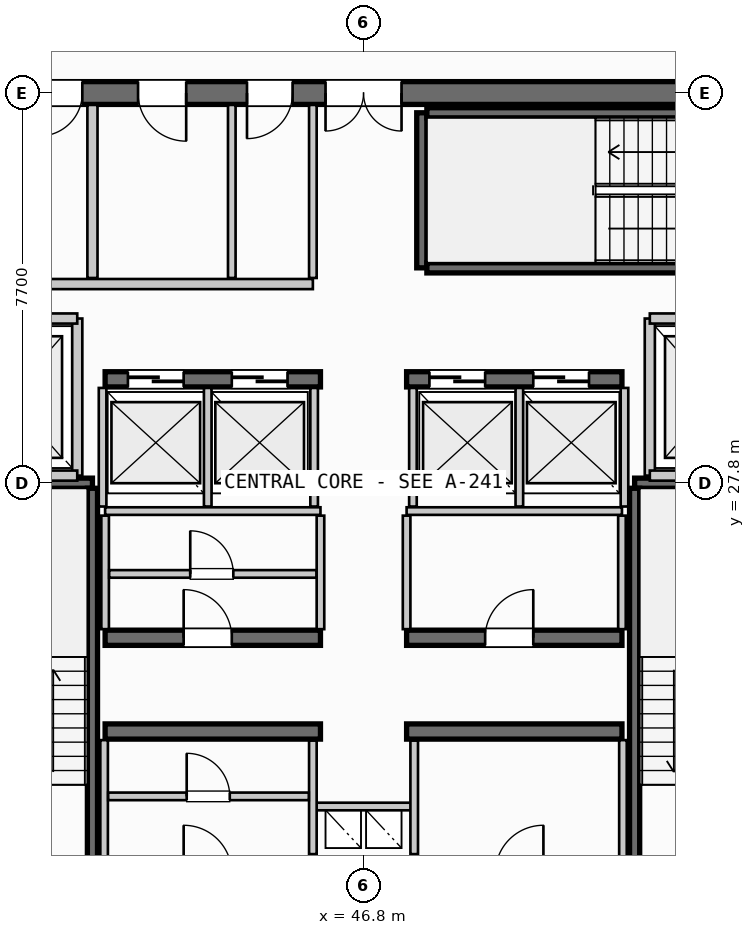
"""IFC4 building model, lengths in metres.
Left out: names, types, materials, properties, quantities, classifications, styles, units other than length and angle.
Written with IfcOpenShell. Run it as: python <this file> out.ifc"""

import sys

from ifc_helpers import new_model, si_unit, direction, frame, frame_2d, origin, place, context, subcontext, project, spatial, rectangle, extrude, source, transform, mapped, element, fill, save


model = new_model("IFC4")
c1 = context("Model", 3, precision=1e-05, world=origin(), true_north=direction((0.0, 1.0)))
c2 = subcontext(c1, "Body", "Model", "MODEL_VIEW")
j1 = project(units=[si_unit("LENGTHUNIT", "METRE"), si_unit("PLANEANGLEUNIT", "RADIAN")], contexts=[c1])
p1 = place(None, origin())
s1 = spatial("IfcSite", under=j1, at=p1, CompositionType="ELEMENT")
p2 = place(p1, origin())
s2 = spatial("IfcBuilding", under=s1, at=p2, CompositionType="ELEMENT")
p3 = place(p2, frame((0.0, 0.0, 293.95)))
s3 = spatial("IfcBuildingStorey", under=s2, at=p3, CompositionType="ELEMENT", Elevation=293.95)
p4 = place(p3, frame((55.6, 35.5, 0.0), z_axis=(0.0, 0.0, 1.0), x_axis=(-1.0, 0.0, 0.0)))
e1 = element("IfcWall", 1, at=p4, inside=s3, PredefinedType="SHEAR", context=c2, shape_type="SweptSolid", body=[
    extrude(rectangle(XDim=17.6, YDim=0.45, at=frame_2d((8.8, 0.0))), origin(), (0.0, 0.0, 1.0), 3.21),
])
p5 = place(p4, frame((8.05, 0.0, 0.0)))
e2 = element("IfcOpeningElement", 2, at=p5, cuts=e1, PredefinedType="OPENING", context=c2, shape_type="SweptSolid", body=[
    extrude(rectangle(XDim=1.5, YDim=2.2, at=frame_2d((0.75, 1.1))), frame((0.0, 0.235, 0.0), z_axis=(0.0, -1.0, 0.0), x_axis=(1.0, 0.0, 0.0)), (0.0, 0.0, 1.0), 0.47),
])
p6 = place(p4, frame((15.85, 0.0, 0.0)))
e3 = element("IfcOpeningElement", 3, at=p6, cuts=e1, PredefinedType="OPENING", context=c2, shape_type="SweptSolid", body=[
    extrude(rectangle(XDim=0.85, YDim=2.15, at=frame_2d((0.425, 1.075))), frame((0.0, 0.235, 0.0), z_axis=(0.0, -1.0, 0.0), x_axis=(1.0, 0.0, 0.0)), (0.0, 0.0, 1.0), 0.47),
])
p7 = place(p4, frame((14.35, 0.0, 0.0)))
e4 = element("IfcOpeningElement", 4, at=p7, cuts=e1, PredefinedType="OPENING", context=c2, shape_type="SweptSolid", body=[
    extrude(rectangle(XDim=0.85, YDim=2.15, at=frame_2d((0.425, 1.075))), frame((0.0, 0.235, 0.0), z_axis=(0.0, -1.0, 0.0), x_axis=(1.0, 0.0, 0.0)), (0.0, 0.0, 1.0), 0.47),
])
p8 = place(p4, frame((12.3, 0.0, 0.0)))
e5 = element("IfcOpeningElement", 5, at=p8, cuts=e1, PredefinedType="OPENING", context=c2, shape_type="SweptSolid", body=[
    extrude(rectangle(XDim=0.95, YDim=2.15, at=frame_2d((0.475, 1.075))), frame((0.0, 0.235, 0.0), z_axis=(0.0, -1.0, 0.0), x_axis=(1.0, 0.0, 0.0)), (0.0, 0.0, 1.0), 0.47),
])
p9 = place(p4, frame((10.2, 0.0, 0.0)))
e6 = element("IfcOpeningElement", 6, at=p9, cuts=e1, PredefinedType="OPENING", context=c2, shape_type="SweptSolid", body=[
    extrude(rectangle(XDim=0.9, YDim=2.15, at=frame_2d((0.45, 1.075))), frame((0.0, 0.235, 0.0), z_axis=(0.0, -1.0, 0.0), x_axis=(1.0, 0.0, 0.0)), (0.0, 0.0, 1.0), 0.47),
])
for number, where, z_axis, x_axis in (
    (7, (41.7, 22.9, 0.0), (0.0, 0.0, 1.0), (1.0, 0.0, 0.0)),
    (8, (47.65, 22.9, 0.0), (0.0, 0.0, 1.0), (1.0, 0.0, 0.0)),
):
    element("IfcWall", number, at=place(p3, frame(where, z_axis=z_axis, x_axis=x_axis)), inside=s3, PredefinedType="SHEAR", context=c2, shape_type="SweptSolid", body=[
        extrude(rectangle(XDim=4.25, YDim=0.3, at=frame_2d((2.125, 0.0))), origin(), (0.0, 0.0, 1.0), 3.21),
    ])
p10 = place(p3, frame((41.7, 24.75, 0.0), z_axis=(0.0, 0.0, 1.0), x_axis=(1.0, 0.0, 0.0)))
e9 = element("IfcWall", 9, at=p10, inside=s3, PredefinedType="SHEAR", context=c2, shape_type="SweptSolid", body=[
    extrude(rectangle(XDim=4.25, YDim=0.3, at=frame_2d((2.125, 0.0))), origin(), (0.0, 0.0, 1.0), 3.21),
])
p11 = place(p10, frame((1.55, 0.0, 0.0)))
e10 = element("IfcOpeningElement", 10, at=p11, cuts=e9, PredefinedType="OPENING", context=c2, shape_type="SweptSolid", body=[
    extrude(rectangle(XDim=0.95, YDim=2.15, at=frame_2d((0.475, 1.075))), frame((0.0, 0.16, 0.0), z_axis=(0.0, -1.0, 0.0), x_axis=(1.0, 0.0, 0.0)), (0.0, 0.0, 1.0), 0.32),
])
p12 = place(p3, frame((47.65, 24.75, 0.0), z_axis=(0.0, 0.0, 1.0), x_axis=(1.0, 0.0, 0.0)))
e11 = element("IfcWall", 11, at=p12, inside=s3, PredefinedType="SHEAR", context=c2, shape_type="SweptSolid", body=[
    extrude(rectangle(XDim=4.25, YDim=0.3, at=frame_2d((2.125, 0.0))), origin(), (0.0, 0.0, 1.0), 3.21),
])
p13 = place(p12, frame((1.55, 0.0, 0.0)))
e12 = element("IfcOpeningElement", 12, at=p13, cuts=e11, PredefinedType="OPENING", context=c2, shape_type="SweptSolid", body=[
    extrude(rectangle(XDim=0.95, YDim=2.15, at=frame_2d((0.475, 1.075))), frame((0.0, 0.16, 0.0), z_axis=(0.0, -1.0, 0.0), x_axis=(1.0, 0.0, 0.0)), (0.0, 0.0, 1.0), 0.32),
])
p14 = place(p3, frame((41.7, 29.85, 0.0), z_axis=(0.0, 0.0, 1.0), x_axis=(1.0, 0.0, 0.0)))
e13 = element("IfcWall", 13, at=p14, inside=s3, PredefinedType="SHEAR", context=c2, shape_type="SweptSolid", body=[
    extrude(rectangle(XDim=4.25, YDim=0.3, at=frame_2d((2.125, 0.0))), origin(), (0.0, 0.0, 1.0), 3.21),
])
p15 = place(p14, frame((0.45, 0.0, 0.0)))
e14 = element("IfcOpeningElement", 14, at=p15, cuts=e13, PredefinedType="OPENING", context=c2, shape_type="SweptSolid", body=[
    extrude(rectangle(XDim=1.1, YDim=2.2, at=frame_2d((0.55, 1.1))), frame((0.0, 0.16, 0.0), z_axis=(0.0, -1.0, 0.0), x_axis=(1.0, 0.0, 0.0)), (0.0, 0.0, 1.0), 0.32),
])
p16 = place(p14, frame((2.5, 0.0, 0.0)))
e15 = element("IfcOpeningElement", 15, at=p16, cuts=e13, PredefinedType="OPENING", context=c2, shape_type="SweptSolid", body=[
    extrude(rectangle(XDim=1.1, YDim=2.2, at=frame_2d((0.55, 1.1))), frame((0.0, 0.16, 0.0), z_axis=(0.0, -1.0, 0.0), x_axis=(1.0, 0.0, 0.0)), (0.0, 0.0, 1.0), 0.32),
])
p17 = place(p3, frame((47.65, 29.85, 0.0), z_axis=(0.0, 0.0, 1.0), x_axis=(1.0, 0.0, 0.0)))
e16 = element("IfcWall", 16, at=p17, inside=s3, PredefinedType="SHEAR", context=c2, shape_type="SweptSolid", body=[
    extrude(rectangle(XDim=4.25, YDim=0.3, at=frame_2d((2.125, 0.0))), origin(), (0.0, 0.0, 1.0), 3.21),
])
p18 = place(p17, frame((0.45, 0.0, 0.0)))
e17 = element("IfcOpeningElement", 17, at=p18, cuts=e16, PredefinedType="OPENING", context=c2, shape_type="SweptSolid", body=[
    extrude(rectangle(XDim=1.1, YDim=2.2, at=frame_2d((0.55, 1.1))), frame((0.0, 0.16, 0.0), z_axis=(0.0, -1.0, 0.0), x_axis=(1.0, 0.0, 0.0)), (0.0, 0.0, 1.0), 0.32),
])
p19 = place(p17, frame((2.5, 0.0, 0.0)))
e18 = element("IfcOpeningElement", 18, at=p19, cuts=e16, PredefinedType="OPENING", context=c2, shape_type="SweptSolid", body=[
    extrude(rectangle(XDim=1.1, YDim=2.2, at=frame_2d((0.55, 1.1))), frame((0.0, 0.16, 0.0), z_axis=(0.0, -1.0, 0.0), x_axis=(1.0, 0.0, 0.0)), (0.0, 0.0, 1.0), 0.32),
])
p20 = place(p3, frame((38.39, 27.8, 0.0), z_axis=(0.0, 0.0, 1.0), x_axis=(1.0, 0.0, 0.0)))
e19 = element("IfcWall", 19, at=p20, inside=s3, PredefinedType="SHEAR", context=c2, shape_type="SweptSolid", body=[
    extrude(rectangle(XDim=3.06, YDim=0.2, at=frame_2d((1.53, 0.0))), origin(), (0.0, 0.0, 1.0), 3.21),
])
p21 = place(p3, frame((41.45, 27.7, 0.0), z_axis=(0.0, 0.0, 1.0), x_axis=(0.0, -1.0, 0.0)))
e20 = element("IfcWall", 20, at=p21, inside=s3, PredefinedType="SHEAR", context=c2, shape_type="SweptSolid", body=[
    extrude(rectangle(XDim=7.35, YDim=0.2, at=frame_2d((3.675, 0.0))), origin(), (0.0, 0.0, 1.0), 3.21),
])
p22 = place(p3, frame((52.15, 27.8, 0.0), z_axis=(0.0, 0.0, 1.0), x_axis=(1.0, 0.0, 0.0)))
e21 = element("IfcWall", 21, at=p22, inside=s3, PredefinedType="SHEAR", context=c2, shape_type="SweptSolid", body=[
    extrude(rectangle(XDim=3.06, YDim=0.2, at=frame_2d((1.53, 0.0))), origin(), (0.0, 0.0, 1.0), 3.21),
])
p23 = place(p3, frame((52.15, 20.35, 0.0), z_axis=(0.0, 0.0, 1.0), x_axis=(0.0, 1.0, 0.0)))
e22 = element("IfcWall", 22, at=p23, inside=s3, PredefinedType="SHEAR", context=c2, shape_type="SweptSolid", body=[
    extrude(rectangle(XDim=7.35, YDim=0.2, at=frame_2d((3.675, 0.0))), origin(), (0.0, 0.0, 1.0), 3.21),
])
p24 = place(p3, frame((47.95, 32.05, 0.0), z_axis=(0.0, 0.0, 1.0), x_axis=(0.0, 1.0, 0.0)))
e23 = element("IfcWall", 23, at=p24, inside=s3, PredefinedType="SHEAR", context=c2, shape_type="SweptSolid", body=[
    extrude(rectangle(XDim=3.06, YDim=0.2, at=frame_2d((1.53, 0.0))), origin(), (0.0, 0.0, 1.0), 3.21),
])
for number, where, z_axis, x_axis in (
    (24, (48.05, 35.11, 0.0), (0.0, 0.0, 1.0), (1.0, 0.0, 0.0)),
    (25, (55.4, 32.05, 0.0), (0.0, 0.0, 1.0), (-1.0, 0.0, 0.0)),
):
    element("IfcWall", number, at=place(p3, frame(where, z_axis=z_axis, x_axis=x_axis)), inside=s3, PredefinedType="SHEAR", context=c2, shape_type="SweptSolid", body=[
        extrude(rectangle(XDim=7.35, YDim=0.2, at=frame_2d((3.675, 0.0))), origin(), (0.0, 0.0, 1.0), 3.21),
    ])
p25 = place(p3, frame((45.8, 21.42, 0.0), z_axis=(0.0, 0.0, 1.0), x_axis=(1.0, 0.0, 0.0)))
e26 = element("IfcWall", 26, at=p25, inside=s3, PredefinedType="PARTITIONING", context=c2, shape_type="SweptSolid", body=[
    extrude(rectangle(XDim=2.0, YDim=0.15, at=frame_2d((1.0, 0.0))), origin(), (0.0, 0.0, 1.0), 2.315),
])
for number, where, z_axis, x_axis in (
    (27, (45.8, 20.48, 0.0), (0.0, 0.0, 1.0), (0.0, 1.0, 0.0)),
    (28, (47.8, 20.48, 0.0), (0.0, 0.0, 1.0), (0.0, 1.0, 0.0)),
):
    element("IfcWall", number, at=place(p3, frame(where, z_axis=z_axis, x_axis=x_axis)), inside=s3, PredefinedType="PARTITIONING", context=c2, shape_type="SweptSolid", body=[
        extrude(rectangle(XDim=2.24, YDim=0.15, at=frame_2d((1.12, 0.0))), origin(), (0.0, 0.0, 1.0), 2.315),
    ])
p26 = place(p3, frame((41.15, 27.95, 0.0), z_axis=(0.0, 0.0, 1.0), x_axis=(0.0, 1.0, 0.0)))
e29 = element("IfcWall", 29, at=p26, inside=s3, PredefinedType="PARTITIONING", context=c2, shape_type="SweptSolid", body=[
    extrude(rectangle(XDim=3.1, YDim=0.2, at=frame_2d((1.55, 0.0))), origin(), (0.0, 0.0, 1.0), 2.315),
])
for number, where, z_axis, x_axis in (
    (30, (38.235, 27.95, 0.0), (0.0, 0.0, 1.0), (1.0, 0.0, 0.0)),
    (31, (38.235, 31.05, 0.0), (0.0, 0.0, 1.0), (1.0, 0.0, 0.0)),
):
    element("IfcWall", number, at=place(p3, frame(where, z_axis=z_axis, x_axis=x_axis)), inside=s3, PredefinedType="PARTITIONING", context=c2, shape_type="SweptSolid", body=[
        extrude(rectangle(XDim=2.915, YDim=0.2, at=frame_2d((1.458, 0.0))), origin(), (0.0, 0.0, 1.0), 2.315),
    ])
p27 = place(p3, frame((52.45, 27.95, 0.0), z_axis=(0.0, 0.0, 1.0), x_axis=(0.0, 1.0, 0.0)))
e32 = element("IfcWall", 32, at=p27, inside=s3, PredefinedType="PARTITIONING", context=c2, shape_type="SweptSolid", body=[
    extrude(rectangle(XDim=3.1, YDim=0.2, at=frame_2d((1.55, 0.0))), origin(), (0.0, 0.0, 1.0), 2.315),
])
for number, where, z_axis, x_axis in (
    (33, (52.45, 27.95, 0.0), (0.0, 0.0, 1.0), (1.0, 0.0, 0.0)),
    (34, (52.45, 31.05, 0.0), (0.0, 0.0, 1.0), (1.0, 0.0, 0.0)),
):
    element("IfcWall", number, at=place(p3, frame(where, z_axis=z_axis, x_axis=x_axis)), inside=s3, PredefinedType="PARTITIONING", context=c2, shape_type="SweptSolid", body=[
        extrude(rectangle(XDim=2.915, YDim=0.2, at=frame_2d((1.458, 0.0))), origin(), (0.0, 0.0, 1.0), 2.315),
    ])
for number, where, z_axis, x_axis in (
    (35, (41.68, 20.335, 0.0), (0.0, 0.0, 1.0), (0.0, 1.0, 0.0)),
    (36, (51.92, 20.335, 0.0), (0.0, 0.0, 1.0), (0.0, 1.0, 0.0)),
):
    element("IfcWall", number, at=place(p3, frame(where, z_axis=z_axis, x_axis=x_axis)), inside=s3, PredefinedType="PARTITIONING", context=c2, shape_type="SweptSolid", body=[
        extrude(rectangle(XDim=2.395, YDim=0.15, at=frame_2d((1.198, 0.0))), origin(), (0.0, 0.0, 1.0), 2.315),
    ])
p28 = place(p3, frame((41.76, 21.62, 0.0), z_axis=(0.0, 0.0, 1.0), x_axis=(1.0, 0.0, 0.0)))
e37 = element("IfcWall", 37, at=p28, inside=s3, PredefinedType="PARTITIONING", context=c2, shape_type="SweptSolid", body=[
    extrude(rectangle(XDim=3.96, YDim=0.15, at=frame_2d((1.98, 0.0))), origin(), (0.0, 0.0, 1.0), 2.315),
])
p29 = place(p28, frame((1.55, 0.0, 0.0)))
e38 = element("IfcOpeningElement", 38, at=p29, cuts=e37, PredefinedType="OPENING", context=c2, shape_type="SweptSolid", body=[
    extrude(rectangle(XDim=0.85, YDim=2.15, at=frame_2d((0.425, 1.075))), frame((0.0, 0.085, 0.0), z_axis=(0.0, -1.0, 0.0), x_axis=(1.0, 0.0, 0.0)), (0.0, 0.0, 1.0), 0.17),
])
for number, where, z_axis, x_axis in (
    (39, (41.7, 27.25, 0.0), (0.0, 0.0, 1.0), (1.0, 0.0, 0.0)),
    (40, (47.65, 27.25, 0.0), (0.0, 0.0, 1.0), (1.0, 0.0, 0.0)),
):
    element("IfcWall", number, at=place(p3, frame(where, z_axis=z_axis, x_axis=x_axis)), inside=s3, PredefinedType="PARTITIONING", context=c2, shape_type="SweptSolid", body=[
        extrude(rectangle(XDim=4.25, YDim=0.15, at=frame_2d((2.125, 0.0))), origin(), (0.0, 0.0, 1.0), 2.315),
    ])
for number, where, z_axis, x_axis in (
    (41, (41.7, 24.92, 0.0), (0.0, 0.0, 1.0), (0.0, 1.0, 0.0)),
    (42, (45.95, 24.92, 0.0), (0.0, 0.0, 1.0), (0.0, 1.0, 0.0)),
    (43, (47.65, 24.92, 0.0), (0.0, 0.0, 1.0), (0.0, 1.0, 0.0)),
    (44, (51.9, 24.92, 0.0), (0.0, 0.0, 1.0), (0.0, 1.0, 0.0)),
):
    element("IfcWall", number, at=place(p3, frame(where, z_axis=z_axis, x_axis=x_axis)), inside=s3, PredefinedType="PARTITIONING", context=c2, shape_type="SweptSolid", body=[
        extrude(rectangle(XDim=2.24, YDim=0.15, at=frame_2d((1.12, 0.0))), origin(), (0.0, 0.0, 1.0), 2.315),
    ])
p30 = place(p3, frame((41.78, 26.01, 0.0), z_axis=(0.0, 0.0, 1.0), x_axis=(1.0, 0.0, 0.0)))
e45 = element("IfcWall", 45, at=p30, inside=s3, PredefinedType="PARTITIONING", context=c2, shape_type="SweptSolid", body=[
    extrude(rectangle(XDim=4.09, YDim=0.15, at=frame_2d((2.045, 0.0))), origin(), (0.0, 0.0, 1.0), 2.315),
])
p31 = place(p30, frame((1.6, 0.0, 0.0)))
e46 = element("IfcOpeningElement", 46, at=p31, cuts=e45, PredefinedType="OPENING", context=c2, shape_type="SweptSolid", body=[
    extrude(rectangle(XDim=0.85, YDim=2.15, at=frame_2d((0.425, 1.075))), frame((0.0, 0.085, 0.0), z_axis=(0.0, -1.0, 0.0), x_axis=(1.0, 0.0, 0.0)), (0.0, 0.0, 1.0), 0.17),
])
for number, where, z_axis, x_axis in (
    (47, (41.65, 27.34, 0.0), (0.0, 0.0, 1.0), (0.0, 1.0, 0.0)),
    (48, (43.725, 27.34, 0.0), (0.0, 0.0, 1.0), (0.0, 1.0, 0.0)),
    (49, (45.825, 27.34, 0.0), (0.0, 0.0, 1.0), (0.0, 1.0, 0.0)),
    (50, (47.775, 27.34, 0.0), (0.0, 0.0, 1.0), (0.0, 1.0, 0.0)),
    (51, (49.875, 27.34, 0.0), (0.0, 0.0, 1.0), (0.0, 1.0, 0.0)),
    (52, (51.95, 27.34, 0.0), (0.0, 0.0, 1.0), (0.0, 1.0, 0.0)),
):
    element("IfcWall", number, at=place(p3, frame(where, z_axis=z_axis, x_axis=x_axis)), inside=s3, PredefinedType="PARTITIONING", context=c2, shape_type="SweptSolid", body=[
        extrude(rectangle(XDim=2.34, YDim=0.15, at=frame_2d((1.17, 0.0))), origin(), (0.0, 0.0, 1.0), 2.315),
    ])
p32 = place(p3, frame((41.45, 31.85, 0.0), z_axis=(0.0, 0.0, 1.0), x_axis=(0.0, 1.0, 0.0)))
e53 = element("IfcWall", 53, at=p32, inside=s3, PredefinedType="PARTITIONING", context=c2, shape_type="SweptSolid", body=[
    extrude(rectangle(XDim=3.415, YDim=0.2, at=frame_2d((1.708, 0.0))), origin(), (0.0, 0.0, 1.0), 2.315),
])
p33 = place(p3, frame((38.235, 31.73, 0.0), z_axis=(0.0, 0.0, 1.0), x_axis=(1.0, 0.0, 0.0)))
e54 = element("IfcWall", 54, at=p33, inside=s3, PredefinedType="PARTITIONING", context=c2, shape_type="SweptSolid", body=[
    extrude(rectangle(XDim=7.565, YDim=0.2, at=frame_2d((3.782, 0.0))), origin(), (0.0, 0.0, 1.0), 2.315),
])
p34 = place(p3, frame((45.8, 31.85, 0.0), z_axis=(0.0, 0.0, 1.0), x_axis=(0.0, 1.0, 0.0)))
e55 = element("IfcWall", 55, at=p34, inside=s3, PredefinedType="PARTITIONING", context=c2, shape_type="SweptSolid", body=[
    extrude(rectangle(XDim=3.415, YDim=0.15, at=frame_2d((1.708, 0.0))), origin(), (0.0, 0.0, 1.0), 2.315),
])
p35 = place(p3, frame((44.2, 31.85, 0.0), z_axis=(0.0, 0.0, 1.0), x_axis=(0.0, 1.0, 0.0)))
e56 = element("IfcWall", 56, at=p35, inside=s3, PredefinedType="PLUMBINGWALL", context=c2, shape_type="SweptSolid", body=[
    extrude(rectangle(XDim=3.415, YDim=0.15, at=frame_2d((1.708, 0.0))), origin(), (0.0, 0.0, 1.0), 2.315),
])
m1 = source(origin(), c2, "Body", "SweptSolid", [
    extrude(rectangle(XDim=1.5, YDim=2.2, at=frame_2d((0.75, 1.1))), frame((0.0, 0.025, 0.0), z_axis=(0.0, -1.0, 0.0), x_axis=(1.0, 0.0, 0.0)), (0.0, 0.0, 1.0), 0.05),
])
p36 = place(p5, origin())
e57 = element("IfcDoor", 57, at=p36, inside=s3, OperationType="DOUBLE_DOOR_SINGLE_SWING", PredefinedType="DOOR", context=c2, shape_type="MappedRepresentation", body=[
    mapped(m1, transform((0.0, 0.0, 0.0), scale=1.0)),
])
fill(e2, e57)
m2 = source(origin(), c2, "Body", "SweptSolid", [
    extrude(rectangle(XDim=0.95, YDim=2.15, at=frame_2d((0.475, 1.075))), frame((0.0, 0.025, 0.0), z_axis=(0.0, -1.0, 0.0), x_axis=(1.0, 0.0, 0.0)), (0.0, 0.0, 1.0), 0.05),
])
p37 = place(p11, origin())
e58 = element("IfcDoor", 58, at=p37, inside=s3, OperationType="SINGLE_SWING_LEFT", PredefinedType="DOOR", context=c2, shape_type="MappedRepresentation", body=[
    mapped(m2, transform((0.0, 0.0, 0.0), scale=1.0)),
])
fill(e10, e58)
p38 = place(p13, origin())
e59 = element("IfcDoor", 59, at=p38, inside=s3, OperationType="SINGLE_SWING_RIGHT", PredefinedType="DOOR", context=c2, shape_type="MappedRepresentation", body=[
    mapped(m2, transform((0.0, 0.0, 0.0), scale=1.0)),
])
fill(e12, e59)
m3 = source(origin(), c2, "Body", "SweptSolid", [
    extrude(rectangle(XDim=1.1, YDim=2.2, at=frame_2d((0.55, 1.1))), frame((0.0, 0.025, 0.0), z_axis=(0.0, -1.0, 0.0), x_axis=(1.0, 0.0, 0.0)), (0.0, 0.0, 1.0), 0.05),
])
p39 = place(p15, origin())
e60 = element("IfcDoor", 60, at=p39, inside=s3, OperationType="SLIDING_TO_LEFT", PredefinedType="DOOR", context=c2, shape_type="MappedRepresentation", body=[
    mapped(m3, transform((0.0, 0.0, 0.0), scale=1.0)),
])
fill(e14, e60)
p40 = place(p16, origin())
e61 = element("IfcDoor", 61, at=p40, inside=s3, OperationType="SLIDING_TO_LEFT", PredefinedType="DOOR", context=c2, shape_type="MappedRepresentation", body=[
    mapped(m3, transform((0.0, 0.0, 0.0), scale=1.0)),
])
fill(e15, e61)
p41 = place(p18, origin())
e62 = element("IfcDoor", 62, at=p41, inside=s3, OperationType="SLIDING_TO_LEFT", PredefinedType="DOOR", context=c2, shape_type="MappedRepresentation", body=[
    mapped(m3, transform((0.0, 0.0, 0.0), scale=1.0)),
])
fill(e17, e62)
p42 = place(p19, origin())
e63 = element("IfcDoor", 63, at=p42, inside=s3, OperationType="SLIDING_TO_LEFT", PredefinedType="DOOR", context=c2, shape_type="MappedRepresentation", body=[
    mapped(m3, transform((0.0, 0.0, 0.0), scale=1.0)),
])
fill(e18, e63)
m4 = source(origin(), c2, "Body", "SweptSolid", [
    extrude(rectangle(XDim=0.85, YDim=2.15, at=frame_2d((0.425, 1.075))), frame((0.0, 0.025, 0.0), z_axis=(0.0, -1.0, 0.0), x_axis=(1.0, 0.0, 0.0)), (0.0, 0.0, 1.0), 0.05),
])
p43 = place(p7, origin())
e64 = element("IfcDoor", 64, at=p43, inside=s3, OperationType="SINGLE_SWING_RIGHT", PredefinedType="DOOR", context=c2, shape_type="MappedRepresentation", body=[
    mapped(m4, transform((0.0, 0.0, 0.0), scale=1.0)),
])
fill(e4, e64)
p44 = place(p8, origin())
e65 = element("IfcDoor", 65, at=p44, inside=s3, OperationType="SINGLE_SWING_LEFT", PredefinedType="DOOR", context=c2, shape_type="MappedRepresentation", body=[
    mapped(m2, transform((0.0, 0.0, 0.0), scale=1.0)),
])
fill(e5, e65)
m5 = source(origin(), c2, "Body", "SweptSolid", [
    extrude(rectangle(XDim=0.9, YDim=2.15, at=frame_2d((0.45, 1.075))), frame((0.0, 0.025, 0.0), z_axis=(0.0, -1.0, 0.0), x_axis=(1.0, 0.0, 0.0)), (0.0, 0.0, 1.0), 0.05),
])
p45 = place(p9, origin())
e66 = element("IfcDoor", 66, at=p45, inside=s3, OperationType="SINGLE_SWING_RIGHT", PredefinedType="DOOR", context=c2, shape_type="MappedRepresentation", body=[
    mapped(m5, transform((0.0, 0.0, 0.0), scale=1.0)),
])
fill(e6, e66)
p46 = place(p29, origin())
e67 = element("IfcDoor", 67, at=p46, inside=s3, OperationType="SINGLE_SWING_LEFT", PredefinedType="DOOR", context=c2, shape_type="MappedRepresentation", body=[
    mapped(m4, transform((0.0, 0.0, 0.0), scale=1.0)),
])
fill(e38, e67)
p47 = place(p31, origin())
e68 = element("IfcDoor", 68, at=p47, inside=s3, OperationType="SINGLE_SWING_LEFT", PredefinedType="DOOR", context=c2, shape_type="MappedRepresentation", body=[
    mapped(m4, transform((0.0, 0.0, 0.0), scale=1.0)),
])
fill(e46, e68)
save(model, sys.argv[1])
